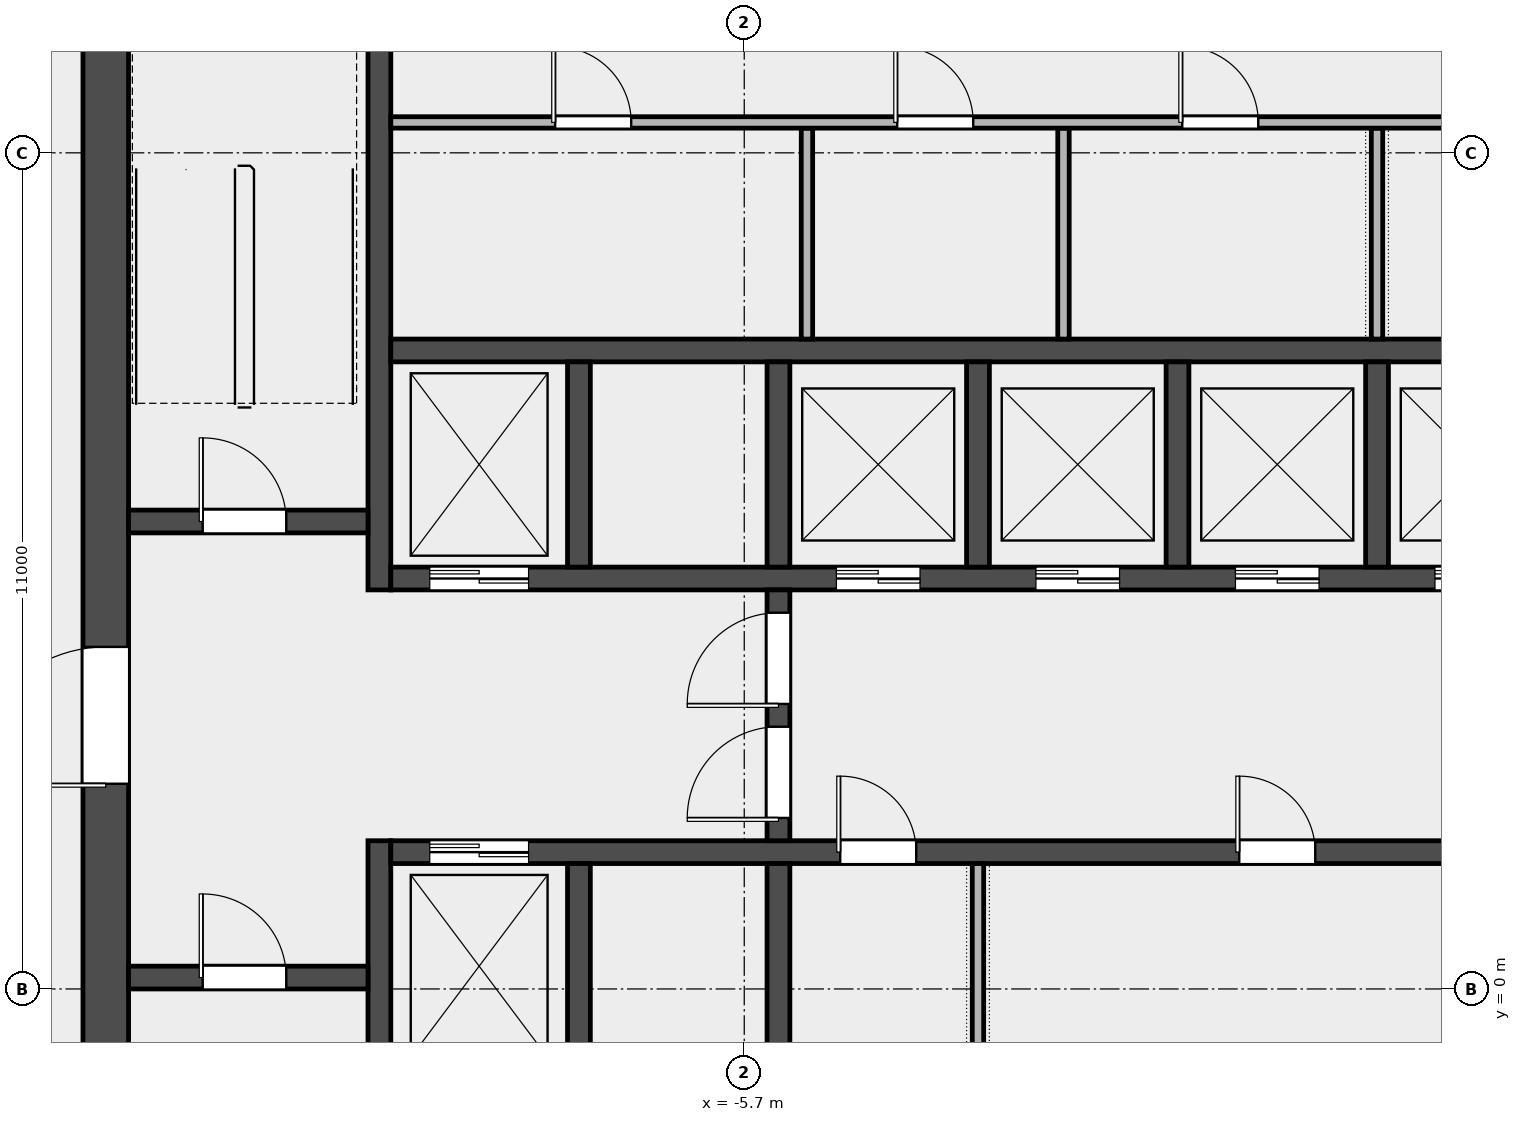
"""IFC4 building model, lengths in metres.
Left out: names, types, materials, properties, quantities, classifications, styles, units other than length and angle.
Written with IfcOpenShell. Run it as: python <this file> out.ifc"""

import sys

from ifc_helpers import new_model, si_unit, direction, frame, frame_2d, origin, place, context, subcontext, project, spatial, rectangle, extrude, element, fill, save


model = new_model("IFC4")
c1 = context("Model", 3, precision=1e-05, world=origin(), true_north=direction((0.0, 1.0)))
c2 = subcontext(c1, "Body", "Model", "MODEL_VIEW")
j1 = project(units=[si_unit("LENGTHUNIT", "METRE"), si_unit("PLANEANGLEUNIT", "RADIAN")], contexts=[c1])
p1 = place(None, origin())
s1 = spatial("IfcSite", under=j1, at=p1, CompositionType="ELEMENT")
p2 = place(p1, origin())
s2 = spatial("IfcBuilding", under=s1, at=p2, CompositionType="ELEMENT")
p3 = place(p2, frame((0.0, 0.0, 353.4)))
s3 = spatial("IfcBuildingStorey", under=s2, at=p3, CompositionType="ELEMENT", Elevation=353.4)
p4 = place(p3, frame((-14.1, -6.6, 0.0), z_axis=(0.0, 0.0, 1.0), x_axis=(0.0, 1.0, 0.0)))
e1 = element("IfcWall", 1, at=p4, inside=s3, PredefinedType="SHEAR", context=c2, shape_type="SweptSolid", body=[
    extrude(rectangle(XDim=19.5, YDim=0.6, at=frame_2d((9.75, 0.0))), origin(), (0.0, 0.0, 1.0), 3.7),
])
p5 = place(p4, frame((9.3, 0.0, 0.0)))
e2 = element("IfcOpeningElement", 2, at=p5, cuts=e1, PredefinedType="OPENING", context=c2, shape_type="SweptSolid", body=[
    extrude(rectangle(XDim=1.8, YDim=2.1, at=frame_2d((0.9, 1.05))), frame((0.0, 0.312, 0.0), z_axis=(0.0, -1.0, 0.0), x_axis=(1.0, 0.0, 0.0)), (0.0, 0.0, 1.0), 0.624),
])
p6 = place(p3, frame((-10.5, -6.6, 0.0), z_axis=(0.0, 0.0, 1.0), x_axis=(0.0, 1.0, 0.0)))
e3 = element("IfcWall", 3, at=p6, inside=s3, PredefinedType="SHEAR", context=c2, shape_type="SweptSolid", body=[
    extrude(rectangle(XDim=8.55, YDim=0.3, at=frame_2d((4.275, 0.0))), origin(), (0.0, 0.0, 1.0), 3.7),
])
p7 = place(p3, frame((-10.5, 5.25, 0.0), z_axis=(0.0, 0.0, 1.0), x_axis=(0.0, 1.0, 0.0)))
e4 = element("IfcWall", 4, at=p7, inside=s3, PredefinedType="SHEAR", context=c2, shape_type="SweptSolid", body=[
    extrude(rectangle(XDim=7.65, YDim=0.3, at=frame_2d((3.825, 0.0))), origin(), (0.0, 0.0, 1.0), 3.7),
])
p8 = place(p3, frame((-13.8, 0.15, 0.0), z_axis=(0.0, 0.0, 1.0), x_axis=(1.0, 0.0, 0.0)))
e5 = element("IfcWall", 5, at=p8, inside=s3, PredefinedType="SOLIDWALL", context=c2, shape_type="SweptSolid", body=[
    extrude(rectangle(XDim=3.15, YDim=0.3, at=frame_2d((1.575, 0.0))), origin(), (0.0, 0.0, 1.0), 3.7),
])
p9 = place(p8, frame((0.975, 0.0, 0.0)))
e6 = element("IfcOpeningElement", 6, at=p9, cuts=e5, PredefinedType="OPENING", context=c2, shape_type="SweptSolid", body=[
    extrude(rectangle(XDim=1.1, YDim=2.1, at=frame_2d((0.55, 1.05))), frame((0.0, 0.162, 0.0), z_axis=(0.0, -1.0, 0.0), x_axis=(1.0, 0.0, 0.0)), (0.0, 0.0, 1.0), 0.324),
])
p10 = place(p3, frame((-13.8, 6.15, 0.0), z_axis=(0.0, 0.0, 1.0), x_axis=(1.0, 0.0, 0.0)))
e7 = element("IfcWall", 7, at=p10, inside=s3, PredefinedType="SOLIDWALL", context=c2, shape_type="SweptSolid", body=[
    extrude(rectangle(XDim=3.15, YDim=0.3, at=frame_2d((1.575, 0.0))), origin(), (0.0, 0.0, 1.0), 3.7),
])
p11 = place(p10, frame((0.975, 0.0, 0.0)))
e8 = element("IfcOpeningElement", 8, at=p11, cuts=e7, PredefinedType="OPENING", context=c2, shape_type="SweptSolid", body=[
    extrude(rectangle(XDim=1.1, YDim=2.1, at=frame_2d((0.55, 1.05))), frame((0.0, 0.162, 0.0), z_axis=(0.0, -1.0, 0.0), x_axis=(1.0, 0.0, 0.0)), (0.0, 0.0, 1.0), 0.324),
])
p12 = place(p3, frame((-10.35, 1.8, 0.0), z_axis=(0.0, 0.0, 1.0), x_axis=(1.0, 0.0, 0.0)))
e9 = element("IfcWall", 9, at=p12, inside=s3, PredefinedType="SOLIDWALL", context=c2, shape_type="SweptSolid", body=[
    extrude(rectangle(XDim=20.7, YDim=0.3, at=frame_2d((10.35, 0.0))), origin(), (0.0, 0.0, 1.0), 3.7),
])
p13 = place(p12, frame((0.512, 0.0, 0.0)))
e10 = element("IfcOpeningElement", 10, at=p13, cuts=e9, PredefinedType="OPENING", context=c2, shape_type="SweptSolid", body=[
    extrude(rectangle(XDim=1.3, YDim=2.1, at=frame_2d((0.65, 1.05))), frame((0.0, 0.162, 0.0), z_axis=(0.0, -1.0, 0.0), x_axis=(1.0, 0.0, 0.0)), (0.0, 0.0, 1.0), 0.324),
])
p14 = place(p12, frame((5.913, 0.0, 0.0)))
e11 = element("IfcOpeningElement", 11, at=p14, cuts=e9, PredefinedType="OPENING", context=c2, shape_type="SweptSolid", body=[
    extrude(rectangle(XDim=1.0, YDim=2.1, at=frame_2d((0.5, 1.05))), frame((0.0, 0.162, 0.0), z_axis=(0.0, -1.0, 0.0), x_axis=(1.0, 0.0, 0.0)), (0.0, 0.0, 1.0), 0.324),
])
p15 = place(p12, frame((11.163, 0.0, 0.0)))
e12 = element("IfcOpeningElement", 12, at=p15, cuts=e9, PredefinedType="OPENING", context=c2, shape_type="SweptSolid", body=[
    extrude(rectangle(XDim=1.0, YDim=2.1, at=frame_2d((0.5, 1.05))), frame((0.0, 0.162, 0.0), z_axis=(0.0, -1.0, 0.0), x_axis=(1.0, 0.0, 0.0)), (0.0, 0.0, 1.0), 0.324),
])
p16 = place(p12, frame((17.725, 0.0, 0.0)))
e13 = element("IfcOpeningElement", 13, at=p16, cuts=e9, PredefinedType="OPENING", context=c2, shape_type="SweptSolid", body=[
    extrude(rectangle(XDim=1.0, YDim=2.1, at=frame_2d((0.5, 1.05))), frame((0.0, 0.162, 0.0), z_axis=(0.0, -1.0, 0.0), x_axis=(1.0, 0.0, 0.0)), (0.0, 0.0, 1.0), 0.324),
])
p17 = place(p3, frame((-10.35, 5.4, 0.0), z_axis=(0.0, 0.0, 1.0), x_axis=(1.0, 0.0, 0.0)))
e14 = element("IfcWall", 14, at=p17, inside=s3, PredefinedType="SOLIDWALL", context=c2, shape_type="SweptSolid", body=[
    extrude(rectangle(XDim=20.7, YDim=0.3, at=frame_2d((10.35, 0.0))), origin(), (0.0, 0.0, 1.0), 3.7),
])
p18 = place(p17, frame((0.512, 0.0, 0.0)))
e15 = element("IfcOpeningElement", 15, at=p18, cuts=e14, PredefinedType="OPENING", context=c2, shape_type="SweptSolid", body=[
    extrude(rectangle(XDim=1.3, YDim=2.1, at=frame_2d((0.65, 1.05))), frame((0.0, 0.162, 0.0), z_axis=(0.0, -1.0, 0.0), x_axis=(1.0, 0.0, 0.0)), (0.0, 0.0, 1.0), 0.324),
])
p19 = place(p17, frame((5.863, 0.0, 0.0)))
e16 = element("IfcOpeningElement", 16, at=p19, cuts=e14, PredefinedType="OPENING", context=c2, shape_type="SweptSolid", body=[
    extrude(rectangle(XDim=1.1, YDim=2.1, at=frame_2d((0.55, 1.05))), frame((0.0, 0.162, 0.0), z_axis=(0.0, -1.0, 0.0), x_axis=(1.0, 0.0, 0.0)), (0.0, 0.0, 1.0), 0.324),
])
p20 = place(p17, frame((8.488, 0.0, 0.0)))
e17 = element("IfcOpeningElement", 17, at=p20, cuts=e14, PredefinedType="OPENING", context=c2, shape_type="SweptSolid", body=[
    extrude(rectangle(XDim=1.1, YDim=2.1, at=frame_2d((0.55, 1.05))), frame((0.0, 0.162, 0.0), z_axis=(0.0, -1.0, 0.0), x_axis=(1.0, 0.0, 0.0)), (0.0, 0.0, 1.0), 0.324),
])
p21 = place(p17, frame((11.113, 0.0, 0.0)))
e18 = element("IfcOpeningElement", 18, at=p21, cuts=e14, PredefinedType="OPENING", context=c2, shape_type="SweptSolid", body=[
    extrude(rectangle(XDim=1.1, YDim=2.1, at=frame_2d((0.55, 1.05))), frame((0.0, 0.162, 0.0), z_axis=(0.0, -1.0, 0.0), x_axis=(1.0, 0.0, 0.0)), (0.0, 0.0, 1.0), 0.324),
])
p22 = place(p17, frame((13.738, 0.0, 0.0)))
e19 = element("IfcOpeningElement", 19, at=p22, cuts=e14, PredefinedType="OPENING", context=c2, shape_type="SweptSolid", body=[
    extrude(rectangle(XDim=1.1, YDim=2.1, at=frame_2d((0.55, 1.05))), frame((0.0, 0.162, 0.0), z_axis=(0.0, -1.0, 0.0), x_axis=(1.0, 0.0, 0.0)), (0.0, 0.0, 1.0), 0.324),
])
p23 = place(p17, frame((16.363, 0.0, 0.0)))
e20 = element("IfcOpeningElement", 20, at=p23, cuts=e14, PredefinedType="OPENING", context=c2, shape_type="SweptSolid", body=[
    extrude(rectangle(XDim=1.1, YDim=2.1, at=frame_2d((0.55, 1.05))), frame((0.0, 0.162, 0.0), z_axis=(0.0, -1.0, 0.0), x_axis=(1.0, 0.0, 0.0)), (0.0, 0.0, 1.0), 0.324),
])
p24 = place(p17, frame((18.988, 0.0, 0.0)))
e21 = element("IfcOpeningElement", 21, at=p24, cuts=e14, PredefinedType="OPENING", context=c2, shape_type="SweptSolid", body=[
    extrude(rectangle(XDim=1.1, YDim=2.1, at=frame_2d((0.55, 1.05))), frame((0.0, 0.162, 0.0), z_axis=(0.0, -1.0, 0.0), x_axis=(1.0, 0.0, 0.0)), (0.0, 0.0, 1.0), 0.324),
])
p25 = place(p3, frame((-10.35, 8.4, 0.0), z_axis=(0.0, 0.0, 1.0), x_axis=(1.0, 0.0, 0.0)))
e22 = element("IfcWall", 22, at=p25, inside=s3, PredefinedType="SOLIDWALL", context=c2, shape_type="SweptSolid", body=[
    extrude(rectangle(XDim=20.7, YDim=0.3, at=frame_2d((10.35, 0.0))), origin(), (0.0, 0.0, 1.0), 3.7),
])
for number, where, z_axis, x_axis in (
    (23, (-7.875, -1.05, 0.0), (0.0, 0.0, 1.0), (0.0, 1.0, 0.0)),
    (24, (-5.25, -1.05, 0.0), (0.0, 0.0, 1.0), (0.0, 1.0, 0.0)),
    (25, (-7.875, 5.55, 0.0), (0.0, 0.0, 1.0), (0.0, 1.0, 0.0)),
    (26, (-5.25, 5.55, 0.0), (0.0, 0.0, 1.0), (0.0, 1.0, 0.0)),
    (27, (-2.625, 5.55, 0.0), (0.0, 0.0, 1.0), (0.0, 1.0, 0.0)),
    (28, (0.0, 5.55, 0.0), (0.0, 0.0, 1.0), (0.0, 1.0, 0.0)),
    (29, (2.625, 5.55, 0.0), (0.0, 0.0, 1.0), (0.0, 1.0, 0.0)),
):
    element("IfcWall", number, at=place(p3, frame(where, z_axis=z_axis, x_axis=x_axis)), inside=s3, PredefinedType="SOLIDWALL", context=c2, shape_type="SweptSolid", body=[
        extrude(rectangle(XDim=2.7, YDim=0.3, at=frame_2d((1.35, 0.0))), origin(), (0.0, 0.0, 1.0), 3.7),
    ])
p26 = place(p3, frame((-5.25, 1.95, 0.0), z_axis=(0.0, 0.0, 1.0), x_axis=(0.0, 1.0, 0.0)))
e30 = element("IfcWall", 30, at=p26, inside=s3, PredefinedType="SOLIDWALL", context=c2, shape_type="SweptSolid", body=[
    extrude(rectangle(XDim=3.3, YDim=0.3, at=frame_2d((1.65, 0.0))), origin(), (0.0, 0.0, 1.0), 3.7),
])
p27 = place(p26, frame((0.3, 0.0, 0.0)))
e31 = element("IfcOpeningElement", 31, at=p27, cuts=e30, PredefinedType="OPENING", context=c2, shape_type="SweptSolid", body=[
    extrude(rectangle(XDim=1.2, YDim=2.1, at=frame_2d((0.6, 1.05))), frame((0.0, 0.162, 0.0), z_axis=(0.0, -1.0, 0.0), x_axis=(1.0, 0.0, 0.0)), (0.0, 0.0, 1.0), 0.324),
])
p28 = place(p26, frame((1.8, 0.0, 0.0)))
e32 = element("IfcOpeningElement", 32, at=p28, cuts=e30, PredefinedType="OPENING", context=c2, shape_type="SweptSolid", body=[
    extrude(rectangle(XDim=1.2, YDim=2.1, at=frame_2d((0.6, 1.05))), frame((0.0, 0.162, 0.0), z_axis=(0.0, -1.0, 0.0), x_axis=(1.0, 0.0, 0.0)), (0.0, 0.0, 1.0), 0.324),
])
for number, where, z_axis, x_axis in (
    (33, (-4.875, 8.55, 0.0), (0.0, 0.0, 1.0), (0.0, 1.0, 0.0)),
    (34, (-1.5, 8.55, 0.0), (0.0, 0.0, 1.0), (0.0, 1.0, 0.0)),
    (35, (2.625, 8.55, 0.0), (0.0, 0.0, 1.0), (0.0, 1.0, 0.0)),
):
    element("IfcWall", number, at=place(p3, frame(where, z_axis=z_axis, x_axis=x_axis)), inside=s3, PredefinedType="PARTITIONING", context=c2, shape_type="SweptSolid", body=[
        extrude(rectangle(XDim=2.775, YDim=0.15, at=frame_2d((1.387, 0.0))), origin(), (0.0, 0.0, 1.0), 3.7),
    ])
p29 = place(p3, frame((-10.35, 11.4, 0.0), z_axis=(0.0, 0.0, 1.0), x_axis=(1.0, 0.0, 0.0)))
e36 = element("IfcWall", 36, at=p29, inside=s3, PredefinedType="PARTITIONING", context=c2, shape_type="SweptSolid", body=[
    extrude(rectangle(XDim=20.7, YDim=0.15, at=frame_2d((10.35, 0.0))), origin(), (0.0, 0.0, 1.0), 3.7),
])
p30 = place(p29, frame((2.163, 0.0, 0.0)))
e37 = element("IfcOpeningElement", 37, at=p30, cuts=e36, PredefinedType="OPENING", context=c2, shape_type="SweptSolid", body=[
    extrude(rectangle(XDim=1.0, YDim=2.1, at=frame_2d((0.5, 1.05))), frame((0.0, 0.087, 0.0), z_axis=(0.0, -1.0, 0.0), x_axis=(1.0, 0.0, 0.0)), (0.0, 0.0, 1.0), 0.174),
])
p31 = place(p29, frame((6.663, 0.0, 0.0)))
e38 = element("IfcOpeningElement", 38, at=p31, cuts=e36, PredefinedType="OPENING", context=c2, shape_type="SweptSolid", body=[
    extrude(rectangle(XDim=1.0, YDim=2.1, at=frame_2d((0.5, 1.05))), frame((0.0, 0.087, 0.0), z_axis=(0.0, -1.0, 0.0), x_axis=(1.0, 0.0, 0.0)), (0.0, 0.0, 1.0), 0.174),
])
p32 = place(p29, frame((10.413, 0.0, 0.0)))
e39 = element("IfcOpeningElement", 39, at=p32, cuts=e36, PredefinedType="OPENING", context=c2, shape_type="SweptSolid", body=[
    extrude(rectangle(XDim=1.0, YDim=2.1, at=frame_2d((0.5, 1.05))), frame((0.0, 0.087, 0.0), z_axis=(0.0, -1.0, 0.0), x_axis=(1.0, 0.0, 0.0)), (0.0, 0.0, 1.0), 0.174),
])
p33 = place(p29, frame((13.975, 0.0, 0.0)))
e40 = element("IfcOpeningElement", 40, at=p33, cuts=e36, PredefinedType="OPENING", context=c2, shape_type="SweptSolid", body=[
    extrude(rectangle(XDim=1.0, YDim=2.1, at=frame_2d((0.5, 1.05))), frame((0.0, 0.087, 0.0), z_axis=(0.0, -1.0, 0.0), x_axis=(1.0, 0.0, 0.0)), (0.0, 0.0, 1.0), 0.174),
])
p34 = place(p29, frame((17.913, 0.0, 0.0)))
e41 = element("IfcOpeningElement", 41, at=p34, cuts=e36, PredefinedType="OPENING", context=c2, shape_type="SweptSolid", body=[
    extrude(rectangle(XDim=1.0, YDim=2.1, at=frame_2d((0.5, 1.05))), frame((0.0, 0.087, 0.0), z_axis=(0.0, -1.0, 0.0), x_axis=(1.0, 0.0, 0.0)), (0.0, 0.0, 1.0), 0.174),
])
p35 = place(p3, frame((-2.625, -1.05, 0.0), z_axis=(0.0, 0.0, 1.0), x_axis=(0.0, 1.0, 0.0)))
e42 = element("IfcWall", 42, at=p35, inside=s3, PredefinedType="PARTITIONING", context=c2, shape_type="SweptSolid", body=[
    extrude(rectangle(XDim=2.7, YDim=0.15, at=frame_2d((1.35, 0.0))), origin(), (0.0, 0.0, 1.0), 3.7),
])
p36 = place(p9, origin())
e43 = element("IfcDoor", 43, at=p36, inside=s3, OperationType="SINGLE_SWING_LEFT", PredefinedType="DOOR", context=c2, shape_type="SweptSolid", body=[
    extrude(rectangle(XDim=1.1, YDim=2.1, at=frame_2d((0.55, 1.05))), frame((0.0, 0.025, 0.0), z_axis=(0.0, -1.0, 0.0), x_axis=(1.0, 0.0, 0.0)), (0.0, 0.0, 1.0), 0.05),
])
fill(e6, e43)
p37 = place(p11, origin())
e44 = element("IfcDoor", 44, at=p37, inside=s3, OperationType="SINGLE_SWING_LEFT", PredefinedType="DOOR", context=c2, shape_type="SweptSolid", body=[
    extrude(rectangle(XDim=1.1, YDim=2.1, at=frame_2d((0.55, 1.05))), frame((0.0, 0.025, 0.0), z_axis=(0.0, -1.0, 0.0), x_axis=(1.0, 0.0, 0.0)), (0.0, 0.0, 1.0), 0.05),
])
fill(e8, e44)
p38 = place(p5, origin())
e45 = element("IfcDoor", 45, at=p38, inside=s3, OperationType="DOUBLE_DOOR_SINGLE_SWING", PredefinedType="DOOR", context=c2, shape_type="SweptSolid", body=[
    extrude(rectangle(XDim=1.8, YDim=2.1, at=frame_2d((0.9, 1.05))), frame((0.0, 0.025, 0.0), z_axis=(0.0, -1.0, 0.0), x_axis=(1.0, 0.0, 0.0)), (0.0, 0.0, 1.0), 0.05),
])
fill(e2, e45)
p39 = place(p27, origin())
e46 = element("IfcDoor", 46, at=p39, inside=s3, OperationType="SINGLE_SWING_LEFT", PredefinedType="DOOR", context=c2, shape_type="SweptSolid", body=[
    extrude(rectangle(XDim=1.2, YDim=2.1, at=frame_2d((0.6, 1.05))), frame((0.0, 0.025, 0.0), z_axis=(0.0, -1.0, 0.0), x_axis=(1.0, 0.0, 0.0)), (0.0, 0.0, 1.0), 0.05),
])
fill(e31, e46)
p40 = place(p28, origin())
e47 = element("IfcDoor", 47, at=p40, inside=s3, OperationType="SINGLE_SWING_RIGHT", PredefinedType="DOOR", context=c2, shape_type="SweptSolid", body=[
    extrude(rectangle(XDim=1.2, YDim=2.1, at=frame_2d((0.6, 1.05))), frame((0.0, 0.025, 0.0), z_axis=(0.0, -1.0, 0.0), x_axis=(1.0, 0.0, 0.0)), (0.0, 0.0, 1.0), 0.05),
])
fill(e32, e47)
p41 = place(p13, origin())
e48 = element("IfcDoor", 48, at=p41, inside=s3, OperationType="DOUBLE_DOOR_SLIDING", PredefinedType="DOOR", context=c2, shape_type="SweptSolid", body=[
    extrude(rectangle(XDim=1.3, YDim=2.1, at=frame_2d((0.65, 1.05))), frame((0.0, 0.025, 0.0), z_axis=(0.0, -1.0, 0.0), x_axis=(1.0, 0.0, 0.0)), (0.0, 0.0, 1.0), 0.05),
])
fill(e10, e48)
p42 = place(p18, origin())
e49 = element("IfcDoor", 49, at=p42, inside=s3, OperationType="DOUBLE_DOOR_SLIDING", PredefinedType="DOOR", context=c2, shape_type="SweptSolid", body=[
    extrude(rectangle(XDim=1.3, YDim=2.1, at=frame_2d((0.65, 1.05))), frame((0.0, 0.025, 0.0), z_axis=(0.0, -1.0, 0.0), x_axis=(1.0, 0.0, 0.0)), (0.0, 0.0, 1.0), 0.05),
])
fill(e15, e49)
p43 = place(p19, origin())
e50 = element("IfcDoor", 50, at=p43, inside=s3, OperationType="DOUBLE_DOOR_SLIDING", PredefinedType="DOOR", context=c2, shape_type="SweptSolid", body=[
    extrude(rectangle(XDim=1.1, YDim=2.1, at=frame_2d((0.55, 1.05))), frame((0.0, 0.025, 0.0), z_axis=(0.0, -1.0, 0.0), x_axis=(1.0, 0.0, 0.0)), (0.0, 0.0, 1.0), 0.05),
])
fill(e16, e50)
p44 = place(p20, origin())
e51 = element("IfcDoor", 51, at=p44, inside=s3, OperationType="DOUBLE_DOOR_SLIDING", PredefinedType="DOOR", context=c2, shape_type="SweptSolid", body=[
    extrude(rectangle(XDim=1.1, YDim=2.1, at=frame_2d((0.55, 1.05))), frame((0.0, 0.025, 0.0), z_axis=(0.0, -1.0, 0.0), x_axis=(1.0, 0.0, 0.0)), (0.0, 0.0, 1.0), 0.05),
])
fill(e17, e51)
p45 = place(p21, origin())
e52 = element("IfcDoor", 52, at=p45, inside=s3, OperationType="DOUBLE_DOOR_SLIDING", PredefinedType="DOOR", context=c2, shape_type="SweptSolid", body=[
    extrude(rectangle(XDim=1.1, YDim=2.1, at=frame_2d((0.55, 1.05))), frame((0.0, 0.025, 0.0), z_axis=(0.0, -1.0, 0.0), x_axis=(1.0, 0.0, 0.0)), (0.0, 0.0, 1.0), 0.05),
])
fill(e18, e52)
p46 = place(p22, origin())
e53 = element("IfcDoor", 53, at=p46, inside=s3, OperationType="DOUBLE_DOOR_SLIDING", PredefinedType="DOOR", context=c2, shape_type="SweptSolid", body=[
    extrude(rectangle(XDim=1.1, YDim=2.1, at=frame_2d((0.55, 1.05))), frame((0.0, 0.025, 0.0), z_axis=(0.0, -1.0, 0.0), x_axis=(1.0, 0.0, 0.0)), (0.0, 0.0, 1.0), 0.05),
])
fill(e19, e53)
p47 = place(p30, origin())
e54 = element("IfcDoor", 54, at=p47, inside=s3, OperationType="SINGLE_SWING_LEFT", PredefinedType="DOOR", context=c2, shape_type="SweptSolid", body=[
    extrude(rectangle(XDim=1.0, YDim=2.1, at=frame_2d((0.5, 1.05))), frame((0.0, 0.025, 0.0), z_axis=(0.0, -1.0, 0.0), x_axis=(1.0, 0.0, 0.0)), (0.0, 0.0, 1.0), 0.05),
])
fill(e37, e54)
p48 = place(p31, origin())
e55 = element("IfcDoor", 55, at=p48, inside=s3, OperationType="SINGLE_SWING_LEFT", PredefinedType="DOOR", context=c2, shape_type="SweptSolid", body=[
    extrude(rectangle(XDim=1.0, YDim=2.1, at=frame_2d((0.5, 1.05))), frame((0.0, 0.025, 0.0), z_axis=(0.0, -1.0, 0.0), x_axis=(1.0, 0.0, 0.0)), (0.0, 0.0, 1.0), 0.05),
])
fill(e38, e55)
p49 = place(p32, origin())
e56 = element("IfcDoor", 56, at=p49, inside=s3, OperationType="SINGLE_SWING_LEFT", PredefinedType="DOOR", context=c2, shape_type="SweptSolid", body=[
    extrude(rectangle(XDim=1.0, YDim=2.1, at=frame_2d((0.5, 1.05))), frame((0.0, 0.025, 0.0), z_axis=(0.0, -1.0, 0.0), x_axis=(1.0, 0.0, 0.0)), (0.0, 0.0, 1.0), 0.05),
])
fill(e39, e56)
p50 = place(p14, origin())
e57 = element("IfcDoor", 57, at=p50, inside=s3, OperationType="SINGLE_SWING_LEFT", PredefinedType="DOOR", context=c2, shape_type="SweptSolid", body=[
    extrude(rectangle(XDim=1.0, YDim=2.1, at=frame_2d((0.5, 1.05))), frame((0.0, 0.025, 0.0), z_axis=(0.0, -1.0, 0.0), x_axis=(1.0, 0.0, 0.0)), (0.0, 0.0, 1.0), 0.05),
])
fill(e11, e57)
p51 = place(p15, origin())
e58 = element("IfcDoor", 58, at=p51, inside=s3, OperationType="SINGLE_SWING_LEFT", PredefinedType="DOOR", context=c2, shape_type="SweptSolid", body=[
    extrude(rectangle(XDim=1.0, YDim=2.1, at=frame_2d((0.5, 1.05))), frame((0.0, 0.025, 0.0), z_axis=(0.0, -1.0, 0.0), x_axis=(1.0, 0.0, 0.0)), (0.0, 0.0, 1.0), 0.05),
])
fill(e12, e58)
save(model, sys.argv[1])
